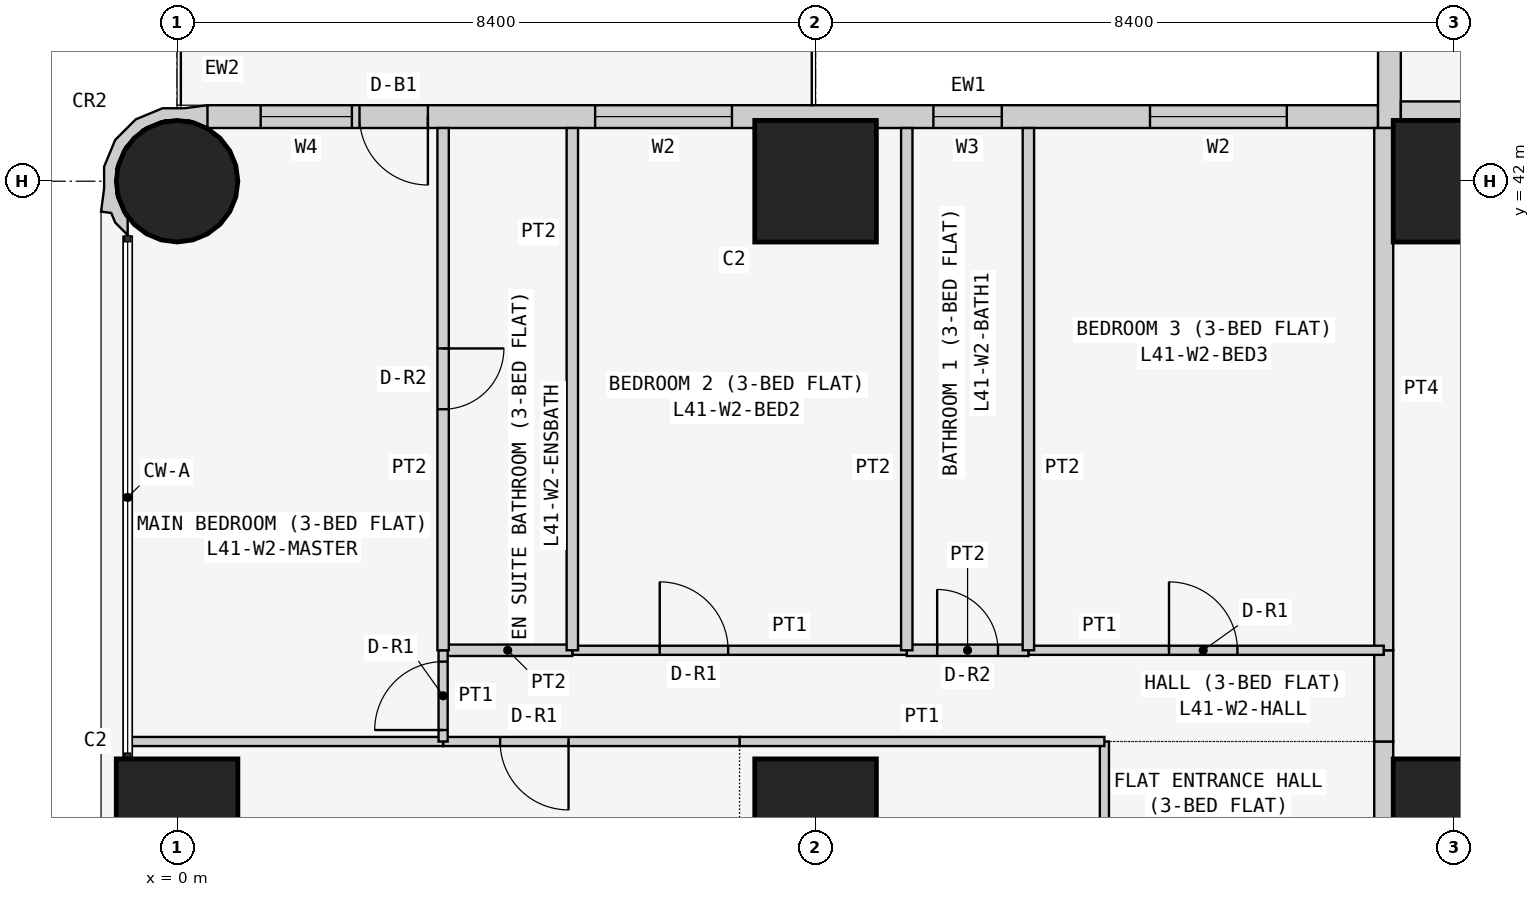
"""IFC4 building model, lengths in metres.
Left out: names, types, materials, properties, quantities, classifications, styles, units other than length and angle.
Written with IfcOpenShell. Run it as: python <this file> out.ifc"""

import sys

from ifc_helpers import new_model, si_unit, direction, frame, frame_2d, origin, origin_2d, place, context, subcontext, project, spatial, polyline, rectangle, circle, outline, extrude, element, fill, save


model = new_model("IFC4")
c1 = context("Model", 3, precision=1e-05, world=origin(), true_north=direction((0.0, 1.0)))
c2 = subcontext(c1, "Body", "Model", "MODEL_VIEW")
j1 = project(units=[si_unit("LENGTHUNIT", "METRE"), si_unit("PLANEANGLEUNIT", "RADIAN")], contexts=[c1])
p1 = place(None, origin())
s1 = spatial("IfcSite", under=j1, at=p1, CompositionType="ELEMENT")
p2 = place(p1, origin())
s2 = spatial("IfcBuilding", under=s1, at=p2, CompositionType="ELEMENT")
p3 = place(p2, frame((0.0, 0.0, 159.3)))
s3 = spatial("IfcBuildingStorey", under=s2, at=p3, CompositionType="ELEMENT", Elevation=159.3)
p4 = place(p3, frame((0.0, 33.6, 0.0), z_axis=(0.0, 0.0, 1.0), x_axis=(1.0, 0.0, 0.0)))
e1 = element("IfcColumn", 1, at=p4, inside=s3, PredefinedType="COLUMN", context=c2, shape_type="SweptSolid", body=[
    extrude(rectangle(XDim=1.6, YDim=1.6, at=origin_2d()), origin(), (0.0, 0.0, 1.0), 3.6),
])
p5 = place(p3, frame((0.0, 42.0, 0.0), z_axis=(0.0, 0.0, 1.0), x_axis=(1.0, 0.0, 0.0)))
e2 = element("IfcColumn", 2, at=p5, inside=s3, PredefinedType="COLUMN", context=c2, shape_type="SweptSolid", body=[
    extrude(circle(Radius=0.8, at=origin_2d()), origin(), (0.0, 0.0, 1.0), 3.6),
])
for number, where, z_axis, x_axis in (
    (3, (8.4, 33.6, 0.0), (0.0, 0.0, 1.0), (1.0, 0.0, 0.0)),
    (4, (8.4, 42.0, 0.0), (0.0, 0.0, 1.0), (1.0, 0.0, 0.0)),
    (5, (16.8, 33.6, 0.0), (0.0, 0.0, 1.0), (1.0, 0.0, 0.0)),
    (6, (16.8, 42.0, 0.0), (0.0, 0.0, 1.0), (1.0, 0.0, 0.0)),
):
    element("IfcColumn", number, at=place(p3, frame(where, z_axis=z_axis, x_axis=x_axis)), inside=s3, PredefinedType="COLUMN", context=c2, shape_type="SweptSolid", body=[
        extrude(rectangle(XDim=1.6, YDim=1.6, at=origin_2d()), origin(), (0.0, 0.0, 1.0), 3.6),
    ])
p6 = place(p3, frame((15.8, 42.85, 0.0), z_axis=(0.0, 0.0, 1.0), x_axis=(-1.0, 0.0, 0.0)))
e7 = element("IfcWall", 7, at=p6, inside=s3, PredefinedType="SOLIDWALL", context=c2, shape_type="SweptSolid", body=[
    extrude(rectangle(XDim=15.4, YDim=0.3, at=frame_2d((7.7, 0.0))), origin(), (0.0, 0.0, 1.0), 3.45),
])
p7 = place(p6, frame((1.2, 0.0, 0.9)))
e8 = element("IfcOpeningElement", 8, at=p7, cuts=e7, PredefinedType="OPENING", context=c2, shape_type="SweptSolid", body=[
    extrude(rectangle(XDim=1.8, YDim=1.5, at=frame_2d((0.9, 0.75))), frame((0.0, 0.16, 0.0), z_axis=(0.0, -1.0, 0.0), x_axis=(1.0, 0.0, 0.0)), (0.0, 0.0, 1.0), 0.32),
])
p8 = place(p6, frame((4.95, 0.0, 1.5)))
e9 = element("IfcOpeningElement", 9, at=p8, cuts=e7, PredefinedType="OPENING", context=c2, shape_type="SweptSolid", body=[
    extrude(rectangle(XDim=0.9, YDim=0.7, at=frame_2d((0.45, 0.35))), frame((0.0, 0.16, 0.0), z_axis=(0.0, -1.0, 0.0), x_axis=(1.0, 0.0, 0.0)), (0.0, 0.0, 1.0), 0.32),
])
p9 = place(p6, frame((8.5, 0.0, 0.9)))
e10 = element("IfcOpeningElement", 10, at=p9, cuts=e7, PredefinedType="OPENING", context=c2, shape_type="SweptSolid", body=[
    extrude(rectangle(XDim=1.8, YDim=1.5, at=frame_2d((0.9, 0.75))), frame((0.0, 0.16, 0.0), z_axis=(0.0, -1.0, 0.0), x_axis=(1.0, 0.0, 0.0)), (0.0, 0.0, 1.0), 0.32),
])
p10 = place(p6, frame((12.5, 0.0, 0.0)))
e11 = element("IfcOpeningElement", 11, at=p10, cuts=e7, PredefinedType="OPENING", context=c2, shape_type="SweptSolid", body=[
    extrude(rectangle(XDim=0.9, YDim=2.4, at=frame_2d((0.45, 1.2))), frame((0.0, 0.16, 0.0), z_axis=(0.0, -1.0, 0.0), x_axis=(1.0, 0.0, 0.0)), (0.0, 0.0, 1.0), 0.32),
])
p11 = place(p6, frame((13.5, 0.0, 0.9)))
e12 = element("IfcOpeningElement", 12, at=p11, cuts=e7, PredefinedType="OPENING", context=c2, shape_type="SweptSolid", body=[
    extrude(rectangle(XDim=1.2, YDim=1.5, at=frame_2d((0.6, 0.75))), frame((0.0, 0.16, 0.0), z_axis=(0.0, -1.0, 0.0), x_axis=(1.0, 0.0, 0.0)), (0.0, 0.0, 1.0), 0.32),
])
p12 = place(p3, frame((15.95, 50.0, 0.0), z_axis=(0.0, 0.0, 1.0), x_axis=(0.0, -1.0, 0.0)))
e13 = element("IfcWall", 13, at=p12, inside=s3, PredefinedType="SOLIDWALL", context=c2, shape_type="SweptSolid", body=[
    extrude(rectangle(XDim=7.3, YDim=0.3, at=frame_2d((3.65, 0.0))), origin(), (0.0, 0.0, 1.0), 3.45),
])
p13 = place(p12, frame((3.1, 0.0, 0.9)))
e14 = element("IfcOpeningElement", 14, at=p13, cuts=e13, PredefinedType="OPENING", context=c2, shape_type="SweptSolid", body=[
    extrude(rectangle(XDim=2.4, YDim=1.5, at=frame_2d((1.2, 0.75))), frame((0.0, 0.16, 0.0), z_axis=(0.0, -1.0, 0.0), x_axis=(1.0, 0.0, 0.0)), (0.0, 0.0, 1.0), 0.32),
])
p14 = place(p12, frame((0.75, 0.0, 0.9)))
e15 = element("IfcOpeningElement", 15, at=p14, cuts=e13, PredefinedType="OPENING", context=c2, shape_type="SweptSolid", body=[
    extrude(rectangle(XDim=1.2, YDim=1.5, at=frame_2d((0.6, 0.75))), frame((0.0, 0.16, 0.0), z_axis=(0.0, -1.0, 0.0), x_axis=(1.0, 0.0, 0.0)), (0.0, 0.0, 1.0), 0.32),
])
p15 = place(p3, frame((0.327, 42.817, 0.0), z_axis=(0.0, 0.0, 1.0), x_axis=(-0.93923434088, 0.343276641956, 0.0)))
e16 = element("IfcWall", 16, at=p15, inside=s3, PredefinedType="SOLIDWALL", context=c2, shape_type="SweptSolid", body=[
    extrude(outline(polyline([(-0.006, -0.197), (0.266, -0.055), (0.535, 0.044), (0.816, 0.302), (0.977, 0.648), (0.994, 1.03), (0.895, 1.299), (0.828, 1.598), (0.697, 1.569), (0.604, 1.67), (0.394, 1.767), (0.471, 1.556), (0.509, 1.539), (0.724, 1.304), (0.833, 1.005), (0.82, 0.687), (0.686, 0.397), (0.451, 0.182), (0.152, 0.073), (-0.116, 0.084), (-0.127, 0.078), (-0.146, 0.071), (-0.006, -0.197)])), origin(), (0.0, 0.0, 1.0), 3.45),
])
p16 = place(p3, frame((16.1, 42.925, 0.0), z_axis=(0.0, 0.0, 1.0), x_axis=(1.0, 0.0, 0.0)))
e17 = element("IfcWall", 17, at=p16, inside=s3, PredefinedType="PARTITIONING", context=c2, shape_type="SweptSolid", body=[
    extrude(rectangle(XDim=6.871, YDim=0.25, at=frame_2d((3.436, 0.0))), origin(), (0.0, 0.0, 1.0), 3.45),
])
p17 = place(p3, frame((15.875, 29.4, 0.0), z_axis=(0.0, 0.0, 1.0), x_axis=(0.0, 1.0, 0.0)))
e18 = element("IfcWall", 18, at=p17, inside=s3, PredefinedType="PARTITIONING", context=c2, shape_type="SweptSolid", body=[
    extrude(rectangle(XDim=5.229, YDim=0.25, at=frame_2d((2.615, 0.0))), origin(), (0.0, 0.0, 1.0), 3.45),
])
p18 = place(p17, frame((2.1, 0.0, 0.0)))
e19 = element("IfcOpeningElement", 19, at=p18, cuts=e18, PredefinedType="OPENING", context=c2, shape_type="SweptSolid", body=[
    extrude(rectangle(XDim=1.0, YDim=2.1, at=frame_2d((0.5, 1.05))), frame((0.0, 0.135, 0.0), z_axis=(0.0, -1.0, 0.0), x_axis=(1.0, 0.0, 0.0)), (0.0, 0.0, 1.0), 0.27),
])
p19 = place(p3, frame((15.875, 34.629, 0.0), z_axis=(0.0, 0.0, 1.0), x_axis=(0.0, 1.0, 0.0)))
e20 = element("IfcWall", 20, at=p19, inside=s3, PredefinedType="PARTITIONING", context=c2, shape_type="SweptSolid", body=[
    extrude(rectangle(XDim=1.2, YDim=0.25, at=frame_2d((0.6, 0.0))), origin(), (0.0, 0.0, 1.0), 3.45),
])
p20 = place(p3, frame((15.875, 35.829, 0.0), z_axis=(0.0, 0.0, 1.0), x_axis=(0.0, 1.0, 0.0)))
e21 = element("IfcWall", 21, at=p20, inside=s3, PredefinedType="PARTITIONING", context=c2, shape_type="SweptSolid", body=[
    extrude(rectangle(XDim=6.871, YDim=0.25, at=frame_2d((3.436, 0.0))), origin(), (0.0, 0.0, 1.0), 3.45),
])
p21 = place(p3, frame((12.2, 29.4, 0.0), z_axis=(0.0, 0.0, 1.0), x_axis=(0.0, 1.0, 0.0)))
e22 = element("IfcWall", 22, at=p21, inside=s3, PredefinedType="PARTITIONING", context=c2, shape_type="SweptSolid", body=[
    extrude(rectangle(XDim=5.229, YDim=0.12, at=frame_2d((2.615, 0.0))), origin(), (0.0, 0.0, 1.0), 3.45),
])
p22 = place(p21, frame((1.05, 0.0, 0.0)))
e23 = element("IfcOpeningElement", 23, at=p22, cuts=e22, PredefinedType="OPENING", context=c2, shape_type="SweptSolid", body=[
    extrude(rectangle(XDim=0.9, YDim=2.1, at=frame_2d((0.45, 1.05))), frame((0.0, 0.07, 0.0), z_axis=(0.0, -1.0, 0.0), x_axis=(1.0, 0.0, 0.0)), (0.0, 0.0, 1.0), 0.14),
])
p23 = place(p3, frame((7.4, 34.629, 0.0), z_axis=(0.0, 0.0, 1.0), x_axis=(1.0, 0.0, 0.0)))
e24 = element("IfcWall", 24, at=p23, inside=s3, PredefinedType="PARTITIONING", context=c2, shape_type="SweptSolid", body=[
    extrude(rectangle(XDim=4.8, YDim=0.12, at=frame_2d((2.4, 0.0))), origin(), (0.0, 0.0, 1.0), 3.45),
])
p24 = place(p3, frame((3.5, 34.629, 0.0), z_axis=(0.0, 0.0, 1.0), x_axis=(1.0, 0.0, 0.0)))
e25 = element("IfcWall", 25, at=p24, inside=s3, PredefinedType="PARTITIONING", context=c2, shape_type="SweptSolid", body=[
    extrude(rectangle(XDim=3.9, YDim=0.12, at=frame_2d((1.95, 0.0))), origin(), (0.0, 0.0, 1.0), 3.45),
])
p25 = place(p24, frame((0.75, 0.0, 0.0)))
e26 = element("IfcOpeningElement", 26, at=p25, cuts=e25, PredefinedType="OPENING", context=c2, shape_type="SweptSolid", body=[
    extrude(rectangle(XDim=0.9, YDim=2.1, at=frame_2d((0.45, 1.05))), frame((0.0, 0.07, 0.0), z_axis=(0.0, -1.0, 0.0), x_axis=(1.0, 0.0, 0.0)), (0.0, 0.0, 1.0), 0.14),
])
p26 = place(p3, frame((-0.65, 34.629, 0.0), z_axis=(0.0, 0.0, 1.0), x_axis=(1.0, 0.0, 0.0)))
e27 = element("IfcWall", 27, at=p26, inside=s3, PredefinedType="PARTITIONING", context=c2, shape_type="SweptSolid", body=[
    extrude(rectangle(XDim=4.15, YDim=0.12, at=frame_2d((2.075, 0.0))), origin(), (0.0, 0.0, 1.0), 3.45),
])
p27 = place(p3, frame((11.2, 35.829, 0.0), z_axis=(0.0, 0.0, 1.0), x_axis=(1.0, 0.0, 0.0)))
e28 = element("IfcWall", 28, at=p27, inside=s3, PredefinedType="PARTITIONING", context=c2, shape_type="SweptSolid", body=[
    extrude(rectangle(XDim=4.675, YDim=0.12, at=frame_2d((2.337, 0.0))), origin(), (0.0, 0.0, 1.0), 3.45),
])
p28 = place(p27, frame((1.85, 0.0, 0.0)))
e29 = element("IfcOpeningElement", 29, at=p28, cuts=e28, PredefinedType="OPENING", context=c2, shape_type="SweptSolid", body=[
    extrude(rectangle(XDim=0.9, YDim=2.1, at=frame_2d((0.45, 1.05))), frame((0.0, 0.07, 0.0), z_axis=(0.0, -1.0, 0.0), x_axis=(1.0, 0.0, 0.0)), (0.0, 0.0, 1.0), 0.14),
])
p29 = place(p3, frame((9.6, 35.829, 0.0), z_axis=(0.0, 0.0, 1.0), x_axis=(1.0, 0.0, 0.0)))
e30 = element("IfcWall", 30, at=p29, inside=s3, PredefinedType="PARTITIONING", context=c2, shape_type="SweptSolid", body=[
    extrude(rectangle(XDim=1.6, YDim=0.15, at=frame_2d((0.8, 0.0))), origin(), (0.0, 0.0, 1.0), 3.45),
])
p30 = place(p29, frame((0.4, 0.0, 0.0)))
e31 = element("IfcOpeningElement", 31, at=p30, cuts=e30, PredefinedType="OPENING", context=c2, shape_type="SweptSolid", body=[
    extrude(rectangle(XDim=0.8, YDim=2.1, at=frame_2d((0.4, 1.05))), frame((0.0, 0.085, 0.0), z_axis=(0.0, -1.0, 0.0), x_axis=(1.0, 0.0, 0.0)), (0.0, 0.0, 1.0), 0.17),
])
p31 = place(p3, frame((5.2, 35.829, 0.0), z_axis=(0.0, 0.0, 1.0), x_axis=(1.0, 0.0, 0.0)))
e32 = element("IfcWall", 32, at=p31, inside=s3, PredefinedType="PARTITIONING", context=c2, shape_type="SweptSolid", body=[
    extrude(rectangle(XDim=4.4, YDim=0.12, at=frame_2d((2.2, 0.0))), origin(), (0.0, 0.0, 1.0), 3.45),
])
p32 = place(p31, frame((1.15, 0.0, 0.0)))
e33 = element("IfcOpeningElement", 33, at=p32, cuts=e32, PredefinedType="OPENING", context=c2, shape_type="SweptSolid", body=[
    extrude(rectangle(XDim=0.9, YDim=2.1, at=frame_2d((0.45, 1.05))), frame((0.0, 0.07, 0.0), z_axis=(0.0, -1.0, 0.0), x_axis=(1.0, 0.0, 0.0)), (0.0, 0.0, 1.0), 0.14),
])
p33 = place(p3, frame((3.5, 35.829, 0.0), z_axis=(0.0, 0.0, 1.0), x_axis=(1.0, 0.0, 0.0)))
e34 = element("IfcWall", 34, at=p33, inside=s3, PredefinedType="PARTITIONING", context=c2, shape_type="SweptSolid", body=[
    extrude(rectangle(XDim=1.7, YDim=0.15, at=frame_2d((0.85, 0.0))), origin(), (0.0, 0.0, 1.0), 3.45),
])
p34 = place(p3, frame((3.5, 34.629, 0.0), z_axis=(0.0, 0.0, 1.0), x_axis=(0.0, 1.0, 0.0)))
e35 = element("IfcWall", 35, at=p34, inside=s3, PredefinedType="PARTITIONING", context=c2, shape_type="SweptSolid", body=[
    extrude(rectangle(XDim=1.2, YDim=0.12, at=frame_2d((0.6, 0.0))), origin(), (0.0, 0.0, 1.0), 3.45),
])
p35 = place(p34, frame((0.151, 0.0, 0.0)))
e36 = element("IfcOpeningElement", 36, at=p35, cuts=e35, PredefinedType="OPENING", context=c2, shape_type="SweptSolid", body=[
    extrude(rectangle(XDim=0.9, YDim=2.1, at=frame_2d((0.45, 1.05))), frame((0.0, 0.07, 0.0), z_axis=(0.0, -1.0, 0.0), x_axis=(1.0, 0.0, 0.0)), (0.0, 0.0, 1.0), 0.14),
])
for number, where, z_axis, x_axis in (
    (37, (11.2, 35.829, 0.0), (0.0, 0.0, 1.0), (0.0, 1.0, 0.0)),
    (38, (9.6, 35.829, 0.0), (0.0, 0.0, 1.0), (0.0, 1.0, 0.0)),
    (39, (5.2, 35.829, 0.0), (0.0, 0.0, 1.0), (0.0, 1.0, 0.0)),
):
    element("IfcWall", number, at=place(p3, frame(where, z_axis=z_axis, x_axis=x_axis)), inside=s3, PredefinedType="PARTITIONING", context=c2, shape_type="SweptSolid", body=[
        extrude(rectangle(XDim=6.871, YDim=0.15, at=frame_2d((3.436, 0.0))), origin(), (0.0, 0.0, 1.0), 3.45),
    ])
p36 = place(p3, frame((3.5, 35.829, 0.0), z_axis=(0.0, 0.0, 1.0), x_axis=(0.0, 1.0, 0.0)))
e40 = element("IfcWall", 40, at=p36, inside=s3, PredefinedType="PARTITIONING", context=c2, shape_type="SweptSolid", body=[
    extrude(rectangle(XDim=6.871, YDim=0.15, at=frame_2d((3.436, 0.0))), origin(), (0.0, 0.0, 1.0), 3.45),
])
p37 = place(p36, frame((3.171, 0.0, 0.0)))
e41 = element("IfcOpeningElement", 41, at=p37, cuts=e40, PredefinedType="OPENING", context=c2, shape_type="SweptSolid", body=[
    extrude(rectangle(XDim=0.8, YDim=2.1, at=frame_2d((0.4, 1.05))), frame((0.0, 0.085, 0.0), z_axis=(0.0, -1.0, 0.0), x_axis=(1.0, 0.0, 0.0)), (0.0, 0.0, 1.0), 0.17),
])
p38 = place(p7, origin())
e42 = element("IfcWindow", 42, at=p38, inside=s3, PartitioningType="SINGLE_PANEL", PredefinedType="WINDOW", context=c2, shape_type="SweptSolid", body=[
    extrude(rectangle(XDim=1.8, YDim=1.5, at=frame_2d((0.9, 0.75))), frame((0.0, 0.03, 0.0), z_axis=(0.0, -1.0, 0.0), x_axis=(1.0, 0.0, 0.0)), (0.0, 0.0, 1.0), 0.06),
])
fill(e8, e42)
p39 = place(p8, origin())
e43 = element("IfcWindow", 43, at=p39, inside=s3, PartitioningType="SINGLE_PANEL", PredefinedType="WINDOW", context=c2, shape_type="SweptSolid", body=[
    extrude(rectangle(XDim=0.9, YDim=0.7, at=frame_2d((0.45, 0.35))), frame((0.0, 0.03, 0.0), z_axis=(0.0, -1.0, 0.0), x_axis=(1.0, 0.0, 0.0)), (0.0, 0.0, 1.0), 0.06),
])
fill(e9, e43)
p40 = place(p9, origin())
e44 = element("IfcWindow", 44, at=p40, inside=s3, PartitioningType="SINGLE_PANEL", PredefinedType="WINDOW", context=c2, shape_type="SweptSolid", body=[
    extrude(rectangle(XDim=1.8, YDim=1.5, at=frame_2d((0.9, 0.75))), frame((0.0, 0.03, 0.0), z_axis=(0.0, -1.0, 0.0), x_axis=(1.0, 0.0, 0.0)), (0.0, 0.0, 1.0), 0.06),
])
fill(e10, e44)
p41 = place(p10, origin())
e45 = element("IfcDoor", 45, at=p41, inside=s3, OperationType="SINGLE_SWING_LEFT", PredefinedType="DOOR", context=c2, shape_type="SweptSolid", body=[
    extrude(rectangle(XDim=0.9, YDim=2.4, at=frame_2d((0.45, 1.2))), frame((0.0, 0.025, 0.0), z_axis=(0.0, -1.0, 0.0), x_axis=(1.0, 0.0, 0.0)), (0.0, 0.0, 1.0), 0.05),
])
fill(e11, e45)
p42 = place(p11, origin())
e46 = element("IfcWindow", 46, at=p42, inside=s3, PartitioningType="SINGLE_PANEL", PredefinedType="WINDOW", context=c2, shape_type="SweptSolid", body=[
    extrude(rectangle(XDim=1.2, YDim=1.5, at=frame_2d((0.6, 0.75))), frame((0.0, 0.03, 0.0), z_axis=(0.0, -1.0, 0.0), x_axis=(1.0, 0.0, 0.0)), (0.0, 0.0, 1.0), 0.06),
])
fill(e12, e46)
p43 = place(p25, frame((0.9, 0.0, 0.0), z_axis=(0.0, 0.0, 1.0), x_axis=(-1.0, 0.0, 0.0)))
e47 = element("IfcDoor", 47, at=p43, inside=s3, OperationType="SINGLE_SWING_LEFT", PredefinedType="DOOR", context=c2, shape_type="SweptSolid", body=[
    extrude(rectangle(XDim=0.9, YDim=2.1, at=frame_2d((0.45, 1.05))), frame((0.0, 0.025, 0.0), z_axis=(0.0, -1.0, 0.0), x_axis=(1.0, 0.0, 0.0)), (0.0, 0.0, 1.0), 0.05),
])
fill(e26, e47)
p44 = place(p28, origin())
e48 = element("IfcDoor", 48, at=p44, inside=s3, OperationType="SINGLE_SWING_LEFT", PredefinedType="DOOR", context=c2, shape_type="SweptSolid", body=[
    extrude(rectangle(XDim=0.9, YDim=2.1, at=frame_2d((0.45, 1.05))), frame((0.0, 0.025, 0.0), z_axis=(0.0, -1.0, 0.0), x_axis=(1.0, 0.0, 0.0)), (0.0, 0.0, 1.0), 0.05),
])
fill(e29, e48)
p45 = place(p30, origin())
e49 = element("IfcDoor", 49, at=p45, inside=s3, OperationType="SINGLE_SWING_LEFT", PredefinedType="DOOR", context=c2, shape_type="SweptSolid", body=[
    extrude(rectangle(XDim=0.8, YDim=2.1, at=frame_2d((0.4, 1.05))), frame((0.0, 0.025, 0.0), z_axis=(0.0, -1.0, 0.0), x_axis=(1.0, 0.0, 0.0)), (0.0, 0.0, 1.0), 0.05),
])
fill(e31, e49)
p46 = place(p32, origin())
e50 = element("IfcDoor", 50, at=p46, inside=s3, OperationType="SINGLE_SWING_LEFT", PredefinedType="DOOR", context=c2, shape_type="SweptSolid", body=[
    extrude(rectangle(XDim=0.9, YDim=2.1, at=frame_2d((0.45, 1.05))), frame((0.0, 0.025, 0.0), z_axis=(0.0, -1.0, 0.0), x_axis=(1.0, 0.0, 0.0)), (0.0, 0.0, 1.0), 0.05),
])
fill(e33, e50)
p47 = place(p35, origin())
e51 = element("IfcDoor", 51, at=p47, inside=s3, OperationType="SINGLE_SWING_LEFT", PredefinedType="DOOR", context=c2, shape_type="SweptSolid", body=[
    extrude(rectangle(XDim=0.9, YDim=2.1, at=frame_2d((0.45, 1.05))), frame((0.0, 0.025, 0.0), z_axis=(0.0, -1.0, 0.0), x_axis=(1.0, 0.0, 0.0)), (0.0, 0.0, 1.0), 0.05),
])
fill(e36, e51)
p48 = place(p37, frame((0.8, 0.0, 0.0), z_axis=(0.0, 0.0, 1.0), x_axis=(-1.0, 0.0, 0.0)))
e52 = element("IfcDoor", 52, at=p48, inside=s3, OperationType="SINGLE_SWING_LEFT", PredefinedType="DOOR", context=c2, shape_type="SweptSolid", body=[
    extrude(rectangle(XDim=0.8, YDim=2.1, at=frame_2d((0.4, 1.05))), frame((0.0, 0.025, 0.0), z_axis=(0.0, -1.0, 0.0), x_axis=(1.0, 0.0, 0.0)), (0.0, 0.0, 1.0), 0.05),
])
fill(e41, e52)
save(model, sys.argv[1])
